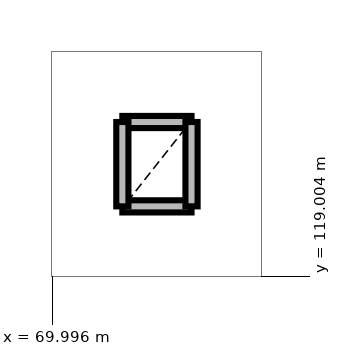
"""IFC4 building model, lengths in metres.
Left out: names, types, materials, properties, quantities, classifications, styles, units other than length and angle.
Written with IfcOpenShell. Run it as: python <this file> out.ifc"""

import sys

from ifc_helpers import new_model, si_unit, direction, frame, frame_2d, origin, place, context, subcontext, project, spatial, rectangle, extrude, element, save


model = new_model("IFC4")
c1 = context("Model", 3, precision=1e-05, world=origin(), true_north=direction((0.0, 1.0)))
c2 = subcontext(c1, "Body", "Model", "MODEL_VIEW")
j1 = project(units=[si_unit("LENGTHUNIT", "METRE"), si_unit("PLANEANGLEUNIT", "RADIAN")], contexts=[c1])
p1 = place(None, origin())
s1 = spatial("IfcSite", under=j1, at=p1, CompositionType="ELEMENT")
p2 = place(p1, origin())
s2 = spatial("IfcBuilding", under=s1, at=p2, CompositionType="ELEMENT")
p3 = place(p2, frame((0.0, 0.0, 9.3)))
s3 = spatial("IfcBuildingStorey", under=s2, at=p3, CompositionType="ELEMENT", Elevation=9.3)
for number, where, z_axis, x_axis in (
    (1, (70.92, 119.92, 0.0), (0.0, 0.0, 1.0), (1.0, 0.0, 0.0)),
    (2, (71.83, 121.03, 0.0), (0.0, 0.0, 1.0), (-1.0, 0.0, 0.0)),
):
    element("IfcWall", number, at=place(p3, frame(where, z_axis=z_axis, x_axis=x_axis)), inside=s3, PredefinedType="PARTITIONING", context=c2, shape_type="SweptSolid", body=[
        extrude(rectangle(XDim=0.91, YDim=0.16, at=frame_2d((0.455, 0.0))), origin(), (0.0, 0.0, 1.0), 3.65),
    ])
for number, where, z_axis, x_axis in (
    (3, (70.92, 121.03, 0.0), (0.0, 0.0, 1.0), (0.0, -1.0, 0.0)),
    (4, (71.83, 119.92, 0.0), (0.0, 0.0, 1.0), (0.0, 1.0, 0.0)),
):
    element("IfcWall", number, at=place(p3, frame(where, z_axis=z_axis, x_axis=x_axis)), inside=s3, PredefinedType="PARTITIONING", context=c2, shape_type="SweptSolid", body=[
        extrude(rectangle(XDim=1.11, YDim=0.16, at=frame_2d((0.555, 0.0))), origin(), (0.0, 0.0, 1.0), 3.65),
    ])
save(model, sys.argv[1])
